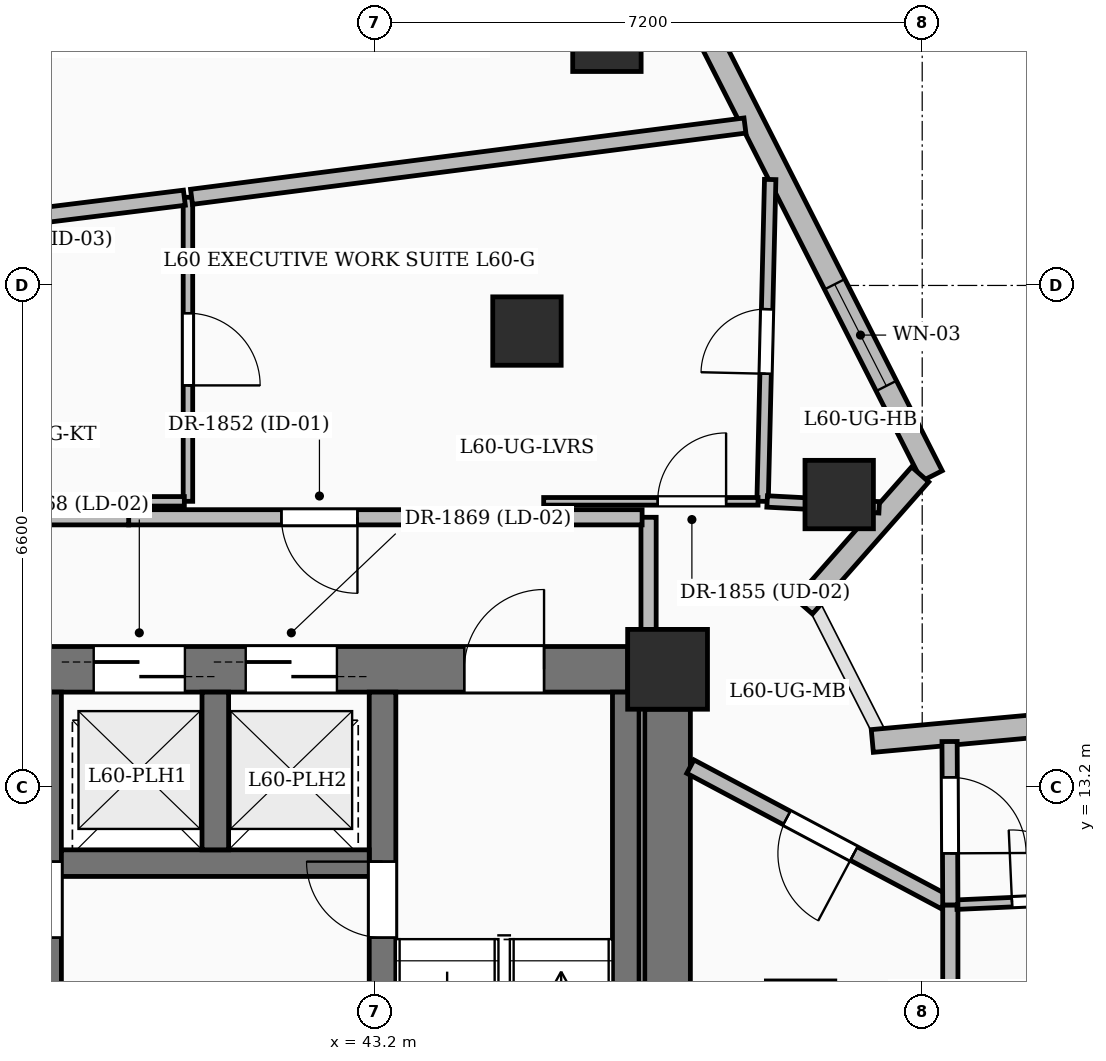
"""IFC4 building model, lengths in metres.
Left out: names, types, materials, properties, quantities, classifications, styles, units other than length and angle.
Written with IfcOpenShell. Run it as: python <this file> out.ifc"""

import sys

from ifc_helpers import new_model, si_unit, direction, frame, frame_2d, origin, origin_2d, place, context, subcontext, project, spatial, rectangle, extrude, element, fill, save


model = new_model("IFC4")
c1 = context("Model", 3, precision=1e-05, world=origin(), true_north=direction((0.0, 1.0)))
c2 = subcontext(c1, "Body", "Model", "MODEL_VIEW")
j1 = project(units=[si_unit("LENGTHUNIT", "METRE"), si_unit("PLANEANGLEUNIT", "RADIAN")], contexts=[c1])
p1 = place(None, origin())
s1 = spatial("IfcSite", under=j1, at=p1, CompositionType="ELEMENT")
p2 = place(p1, origin())
s2 = spatial("IfcBuilding", under=s1, at=p2, CompositionType="ELEMENT")
p3 = place(p2, frame((0.0, 0.0, 233.25)))
s3 = spatial("IfcBuildingStorey", under=s2, at=p3, CompositionType="ELEMENT", Elevation=233.25)
p4 = place(p3, frame((47.05, 14.75, 0.0), z_axis=(0.0, 0.0, 1.0), x_axis=(1.0, 0.0, 0.0)))
e1 = element("IfcColumn", 1, at=p4, inside=s3, PredefinedType="COLUMN", context=c2, shape_type="SweptSolid", body=[
    extrude(rectangle(XDim=1.05, YDim=1.05, at=origin_2d()), origin(), (0.0, 0.0, 1.0), 3.75),
])
p5 = place(p3, frame((45.2, 19.2, 0.0), z_axis=(0.0, 0.0, 1.0), x_axis=(1.0, 0.0, 0.0)))
e2 = element("IfcColumn", 2, at=p5, inside=s3, PredefinedType="COLUMN", context=c2, shape_type="SweptSolid", body=[
    extrude(rectangle(XDim=0.9, YDim=0.9, at=origin_2d()), origin(), (0.0, 0.0, 1.0), 3.75),
])
p6 = place(p3, frame((35.675, 14.75, 0.0), z_axis=(0.0, 0.0, 1.0), x_axis=(1.0, 0.0, 0.0)))
e3 = element("IfcWall", 3, at=p6, inside=s3, PredefinedType="SHEAR", context=c2, shape_type="SweptSolid", body=[
    extrude(rectangle(XDim=10.85, YDim=0.6, at=frame_2d((5.425, 0.0))), origin(), (0.0, 0.0, 1.0), 3.75),
])
p7 = place(p6, frame((1.1, 0.0, 0.0)))
e4 = element("IfcOpeningElement", 4, at=p7, cuts=e3, PredefinedType="OPENING", context=c2, shape_type="SweptSolid", body=[
    extrude(rectangle(XDim=1.05, YDim=2.15, at=frame_2d((0.525, 1.075))), frame((0.0, 0.31, 0.0), z_axis=(0.0, -1.0, 0.0), x_axis=(1.0, 0.0, 0.0)), (0.0, 0.0, 1.0), 0.62),
])
p8 = place(p6, frame((8.7, 0.0, 0.0)))
e5 = element("IfcOpeningElement", 5, at=p8, cuts=e3, PredefinedType="OPENING", context=c2, shape_type="SweptSolid", body=[
    extrude(rectangle(XDim=1.05, YDim=2.15, at=frame_2d((0.525, 1.075))), frame((0.0, 0.31, 0.0), z_axis=(0.0, -1.0, 0.0), x_axis=(1.0, 0.0, 0.0)), (0.0, 0.0, 1.0), 0.62),
])
p9 = place(p6, frame((3.825, 0.0, 0.0)))
e6 = element("IfcOpeningElement", 6, at=p9, cuts=e3, PredefinedType="OPENING", context=c2, shape_type="SweptSolid", body=[
    extrude(rectangle(XDim=1.2, YDim=2.2, at=frame_2d((0.6, 1.1))), frame((0.0, 0.31, 0.0), z_axis=(0.0, -1.0, 0.0), x_axis=(1.0, 0.0, 0.0)), (0.0, 0.0, 1.0), 0.62),
])
p10 = place(p6, frame((5.825, 0.0, 0.0)))
e7 = element("IfcOpeningElement", 7, at=p10, cuts=e3, PredefinedType="OPENING", context=c2, shape_type="SweptSolid", body=[
    extrude(rectangle(XDim=1.2, YDim=2.2, at=frame_2d((0.6, 1.1))), frame((0.0, 0.31, 0.0), z_axis=(0.0, -1.0, 0.0), x_axis=(1.0, 0.0, 0.0)), (0.0, 0.0, 1.0), 0.62),
])
p11 = place(p3, frame((47.05, 5.075, 0.0), z_axis=(0.0, 0.0, 1.0), x_axis=(0.0, 1.0, 0.0)))
e8 = element("IfcWall", 8, at=p11, inside=s3, PredefinedType="SHEAR", context=c2, shape_type="SweptSolid", body=[
    extrude(rectangle(XDim=9.15, YDim=0.6, at=frame_2d((4.575, 0.0))), origin(), (0.0, 0.0, 1.0), 3.75),
])
p12 = place(p3, frame((38.9, 5.2, 0.0), z_axis=(0.0, 0.0, 1.0), x_axis=(0.0, 1.0, 0.0)))
e9 = element("IfcWall", 9, at=p12, inside=s3, PredefinedType="SOLIDWALL", context=c2, shape_type="SweptSolid", body=[
    extrude(rectangle(XDim=9.25, YDim=0.35, at=frame_2d((4.625, 0.0))), origin(), (0.0, 0.0, 1.0), 3.75),
])
p13 = place(p12, frame((6.02, 0.0, 0.0)))
e10 = element("IfcOpeningElement", 10, at=p13, cuts=e9, PredefinedType="OPENING", context=c2, shape_type="SweptSolid", body=[
    extrude(rectangle(XDim=1.0, YDim=2.15, at=frame_2d((0.5, 1.075))), frame((0.0, 0.185, 0.0), z_axis=(0.0, -1.0, 0.0), x_axis=(1.0, 0.0, 0.0)), (0.0, 0.0, 1.0), 0.37),
])
p14 = place(p3, frame((43.3, 5.2, 0.0), z_axis=(0.0, 0.0, 1.0), x_axis=(0.0, 1.0, 0.0)))
e11 = element("IfcWall", 11, at=p14, inside=s3, PredefinedType="SOLIDWALL", context=c2, shape_type="SweptSolid", body=[
    extrude(rectangle(XDim=9.25, YDim=0.35, at=frame_2d((4.625, 0.0))), origin(), (0.0, 0.0, 1.0), 3.75),
])
p15 = place(p14, frame((6.02, 0.0, 0.0)))
e12 = element("IfcOpeningElement", 12, at=p15, cuts=e11, PredefinedType="OPENING", context=c2, shape_type="SweptSolid", body=[
    extrude(rectangle(XDim=1.0, YDim=2.15, at=frame_2d((0.5, 1.075))), frame((0.0, 0.185, 0.0), z_axis=(0.0, -1.0, 0.0), x_axis=(1.0, 0.0, 0.0)), (0.0, 0.0, 1.0), 0.37),
])
p16 = place(p3, frame((46.5, 5.2, 0.0), z_axis=(0.0, 0.0, 1.0), x_axis=(0.0, 1.0, 0.0)))
e13 = element("IfcWall", 13, at=p16, inside=s3, PredefinedType="SOLIDWALL", context=c2, shape_type="SweptSolid", body=[
    extrude(rectangle(XDim=9.25, YDim=0.35, at=frame_2d((4.625, 0.0))), origin(), (0.0, 0.0, 1.0), 3.75),
])
p17 = place(p3, frame((39.075, 12.2, 0.0), z_axis=(0.0, 0.0, 1.0), x_axis=(1.0, 0.0, 0.0)))
e14 = element("IfcWall", 14, at=p17, inside=s3, PredefinedType="SOLIDWALL", context=c2, shape_type="SweptSolid", body=[
    extrude(rectangle(XDim=4.05, YDim=0.35, at=frame_2d((2.025, 0.0))), origin(), (0.0, 0.0, 1.0), 3.75),
])
p18 = place(p3, frame((41.1, 12.375, 0.0), z_axis=(0.0, 0.0, 1.0), x_axis=(0.0, 1.0, 0.0)))
e15 = element("IfcWall", 15, at=p18, inside=s3, PredefinedType="SOLIDWALL", context=c2, shape_type="SweptSolid", body=[
    extrude(rectangle(XDim=2.075, YDim=0.35, at=frame_2d((1.038, 0.0))), origin(), (0.0, 0.0, 1.0), 3.75),
])
for number, where, z_axis, x_axis in (
    (16, (49.308, 17.049, 0.0), (0.0, 0.0, 1.0), (1.0, 0.0, 0.0)),
    (17, (46.252, 23.065, 0.0), (0.0, 0.0, 1.0), (1.0, 0.0, 0.0)),
):
    element("IfcColumn", number, at=place(p3, frame(where, z_axis=z_axis, x_axis=x_axis)), inside=s3, PredefinedType="COLUMN", context=c2, shape_type="SweptSolid", body=[
        extrude(rectangle(XDim=0.9, YDim=0.9, at=origin_2d()), origin(), (0.0, 0.0, 1.0), 3.75),
    ])
p19 = place(p3, frame((47.369, 23.516, 0.0), z_axis=(0.0, 0.0, 1.0), x_axis=(0.452872520075, -0.891575280367, 0.0)))
e18 = element("IfcWall", 18, at=p19, inside=s3, PredefinedType="SOLIDWALL", context=c2, shape_type="SweptSolid", body=[
    extrude(rectangle(XDim=6.978, YDim=0.3, at=frame_2d((3.489, 0.0))), origin(), (0.0, 0.0, 1.0), 3.5),
])
p20 = place(p19, frame((4.15, 0.0, 0.6)))
e19 = element("IfcOpeningElement", 19, at=p20, cuts=e18, PredefinedType="OPENING", context=c2, shape_type="SweptSolid", body=[
    extrude(rectangle(XDim=1.5, YDim=2.1, at=frame_2d((0.75, 1.05))), frame((0.0, 0.16, 0.0), z_axis=(0.0, -1.0, 0.0), x_axis=(1.0, 0.0, 0.0)), (0.0, 0.0, 1.0), 0.32),
])
p21 = place(p3, frame((50.374, 17.314, 0.0), z_axis=(0.0, 0.0, 1.0), x_axis=(-0.661181862719, -0.750225662325, 0.0)))
e20 = element("IfcWall", 20, at=p21, inside=s3, PredefinedType="SOLIDWALL", context=c2, shape_type="SweptSolid", body=[
    extrude(rectangle(XDim=2.314, YDim=0.3, at=frame_2d((1.157, 0.0))), origin(), (0.0, 0.0, 1.0), 2.825),
])
p22 = place(p3, frame((49.744, 13.807, 0.0), z_axis=(0.0, 0.0, 1.0), x_axis=(0.995831248554, 0.091214715932, 0.0)))
e21 = element("IfcWall", 21, at=p22, inside=s3, PredefinedType="SOLIDWALL", context=c2, shape_type="SweptSolid", body=[
    extrude(rectangle(XDim=2.594, YDim=0.3, at=frame_2d((1.297, 0.0))), origin(), (0.0, 0.0, 1.0), 2.825),
])
p23 = place(p3, frame((44.98, 16.75, 0.0), z_axis=(0.0, 0.0, 1.0), x_axis=(-1.0, 0.0, 0.0)))
e22 = element("IfcWall", 22, at=p23, inside=s3, PredefinedType="PARTITIONING", context=c2, shape_type="SweptSolid", body=[
    extrude(rectangle(XDim=5.02, YDim=0.2, at=frame_2d((2.51, 0.0))), origin(), (0.0, 0.0, 1.0), 3.5),
])
p24 = place(p23, frame((2.01, 0.0, 0.0)))
e23 = element("IfcOpeningElement", 23, at=p24, cuts=e22, PredefinedType="OPENING", context=c2, shape_type="SweptSolid", body=[
    extrude(rectangle(XDim=1.0, YDim=2.2, at=frame_2d((0.5, 1.1))), frame((0.0, 0.11, 0.0), z_axis=(0.0, -1.0, 0.0), x_axis=(1.0, 0.0, 0.0)), (0.0, 0.0, 1.0), 0.22),
])
p25 = place(p3, frame((39.96, 16.75, 0.0), z_axis=(0.0, 0.0, 1.0), x_axis=(-1.0, 0.0, 0.0)))
e24 = element("IfcWall", 24, at=p25, inside=s3, PredefinedType="PARTITIONING", context=c2, shape_type="SweptSolid", body=[
    extrude(rectangle(XDim=2.21, YDim=0.2, at=frame_2d((1.105, 0.0))), origin(), (0.0, 0.0, 1.0), 3.5),
])
p26 = place(p3, frame((46.8, 15.05, 0.0), z_axis=(0.0, 0.0, 1.0), x_axis=(0.0, 1.0, 0.0)))
e25 = element("IfcWall", 25, at=p26, inside=s3, PredefinedType="PARTITIONING", context=c2, shape_type="SweptSolid", body=[
    extrude(rectangle(XDim=1.7, YDim=0.2, at=frame_2d((0.85, 0.0))), origin(), (0.0, 0.0, 1.0), 2.685),
])
p27 = place(p3, frame((46.715, 16.75, 0.0), z_axis=(0.0, 0.0, 1.0), x_axis=(-1.0, 0.0, 0.0)))
e26 = element("IfcWall", 26, at=p27, inside=s3, PredefinedType="PARTITIONING", context=c2, shape_type="SweptSolid", body=[
    extrude(rectangle(XDim=1.675, YDim=0.2, at=frame_2d((0.837, 0.0))), origin(), (0.0, 0.0, 1.0), 2.685),
])
p28 = place(p3, frame((50.77, 8.16, 0.0), z_axis=(0.0, 0.0, 1.0), x_axis=(0.0, 1.0, 0.0)))
e27 = element("IfcWall", 27, at=p28, inside=s3, PredefinedType="PARTITIONING", context=c2, shape_type="SweptSolid", body=[
    extrude(rectangle(XDim=3.49, YDim=0.2, at=frame_2d((1.745, 0.0))), origin(), (0.0, 0.0, 1.0), 2.685),
])
p29 = place(p3, frame((50.695, 11.69, 0.0), z_axis=(0.0, 0.0, 1.0), x_axis=(-0.882785979597, 0.469775386996, 0.0)))
e28 = element("IfcWall", 28, at=p29, inside=s3, PredefinedType="PARTITIONING", context=c2, shape_type="SweptSolid", body=[
    extrude(rectangle(XDim=3.789, YDim=0.2, at=frame_2d((1.895, 0.0))), origin(), (0.0, 0.0, 1.0), 3.5),
])
p30 = place(p29, frame((1.352, 0.0, 0.0)))
e29 = element("IfcOpeningElement", 29, at=p30, cuts=e28, PredefinedType="OPENING", context=c2, shape_type="SweptSolid", body=[
    extrude(rectangle(XDim=1.0, YDim=2.2, at=frame_2d((0.5, 1.1))), frame((0.0, 0.11, 0.0), z_axis=(0.0, -1.0, 0.0), x_axis=(1.0, 0.0, 0.0)), (0.0, 0.0, 1.0), 0.22),
])
p31 = place(p3, frame((50.855, 11.654, 0.0), z_axis=(0.0, 0.0, 1.0), x_axis=(0.998974472406, 0.045276964139, 0.0)))
e30 = element("IfcWall", 30, at=p31, inside=s3, PredefinedType="PARTITIONING", context=c2, shape_type="SweptSolid", body=[
    extrude(rectangle(XDim=2.373, YDim=0.125, at=frame_2d((1.186, 0.0))), origin(), (0.0, 0.0, 1.0), 2.82),
])
p32 = place(p31, frame((0.727, 0.0, 0.0)))
e31 = element("IfcOpeningElement", 31, at=p32, cuts=e30, PredefinedType="OPENING", context=c2, shape_type="SweptSolid", body=[
    extrude(rectangle(XDim=0.95, YDim=2.2, at=frame_2d((0.475, 1.1))), frame((0.0, 0.072, 0.0), z_axis=(0.0, -1.0, 0.0), x_axis=(1.0, 0.0, 0.0)), (0.0, 0.0, 1.0), 0.145),
])
p33 = place(p3, frame((50.76, 13.8, 0.0), z_axis=(0.0, 0.0, 1.0), x_axis=(0.004655337313, -0.999989163859, 0.0)))
e32 = element("IfcWall", 32, at=p33, inside=s3, PredefinedType="PARTITIONING", context=c2, shape_type="SweptSolid", body=[
    extrude(rectangle(XDim=2.15, YDim=0.2, at=frame_2d((1.075, 0.0))), origin(), (0.0, 0.0, 1.0), 2.82),
])
p34 = place(p33, frame((0.471, 0.0, 0.0)))
e33 = element("IfcOpeningElement", 33, at=p34, cuts=e32, PredefinedType="OPENING", context=c2, shape_type="SweptSolid", body=[
    extrude(rectangle(XDim=1.0, YDim=2.2, at=frame_2d((0.5, 1.1))), frame((0.0, 0.11, 0.0), z_axis=(0.0, -1.0, 0.0), x_axis=(1.0, 0.0, 0.0)), (0.0, 0.0, 1.0), 0.22),
])
p35 = place(p3, frame((48.3, 16.96, 0.0), z_axis=(0.0, 0.0, 1.0), x_axis=(0.023576446584, 0.999722036951, 0.0)))
e34 = element("IfcWall", 34, at=p35, inside=s3, PredefinedType="PARTITIONING", context=c2, shape_type="SweptSolid", body=[
    extrude(rectangle(XDim=4.235, YDim=0.15, at=frame_2d((2.118, 0.0))), origin(), (0.0, 0.0, 1.0), 2.82),
])
p36 = place(p35, frame((1.679, 0.0, 0.0)))
e35 = element("IfcOpeningElement", 35, at=p36, cuts=e34, PredefinedType="OPENING", context=c2, shape_type="SweptSolid", body=[
    extrude(rectangle(XDim=0.85, YDim=2.1, at=frame_2d((0.425, 1.05))), frame((0.0, 0.085, 0.0), z_axis=(0.0, -1.0, 0.0), x_axis=(1.0, 0.0, 0.0)), (0.0, 0.0, 1.0), 0.17),
])
p37 = place(p3, frame((40.74, 20.96, 0.0), z_axis=(0.0, 0.0, 1.0), x_axis=(0.0, -1.0, 0.0)))
e36 = element("IfcWall", 36, at=p37, inside=s3, PredefinedType="PARTITIONING", context=c2, shape_type="SweptSolid", body=[
    extrude(rectangle(XDim=4.0, YDim=0.125, at=frame_2d((2.0, 0.0))), origin(), (0.0, 0.0, 1.0), 3.5),
])
p38 = place(p37, frame((1.525, 0.0, 0.0)))
e37 = element("IfcOpeningElement", 37, at=p38, cuts=e36, PredefinedType="OPENING", context=c2, shape_type="SweptSolid", body=[
    extrude(rectangle(XDim=0.95, YDim=2.2, at=frame_2d((0.475, 1.1))), frame((0.0, 0.072, 0.0), z_axis=(0.0, -1.0, 0.0), x_axis=(1.0, 0.0, 0.0)), (0.0, 0.0, 1.0), 0.145),
])
p39 = place(p3, frame((40.692, 16.96, 0.0), z_axis=(0.0, 0.0, 1.0), x_axis=(-1.0, 0.0, 0.0)))
e38 = element("IfcWall", 38, at=p39, inside=s3, PredefinedType="PARTITIONING", context=c2, shape_type="SweptSolid", body=[
    extrude(rectangle(XDim=0.732, YDim=0.125, at=frame_2d((0.366, 0.0))), origin(), (0.0, 0.0, 1.0), 3.5),
])
p40 = place(p3, frame((45.42, 16.96, 0.0), z_axis=(0.0, 0.0, 1.0), x_axis=(1.0, 0.0, 0.0)))
e39 = element("IfcWall", 39, at=p40, inside=s3, PredefinedType="PARTITIONING", context=c2, shape_type="SweptSolid", body=[
    extrude(rectangle(XDim=2.82, YDim=0.1, at=frame_2d((1.41, 0.0))), origin(), (0.0, 0.0, 1.0), 2.685),
])
p41 = place(p40, frame((1.5, 0.0, 0.0)))
e40 = element("IfcOpeningElement", 40, at=p41, cuts=e39, PredefinedType="OPENING", context=c2, shape_type="SweptSolid", body=[
    extrude(rectangle(XDim=0.9, YDim=2.15, at=frame_2d((0.45, 1.075))), frame((0.0, 0.06, 0.0), z_axis=(0.0, -1.0, 0.0), x_axis=(1.0, 0.0, 0.0)), (0.0, 0.0, 1.0), 0.12),
])
p42 = place(p3, frame((48.068, 21.904, 0.0), z_axis=(0.0, 0.0, 1.0), x_axis=(-0.991803716191, -0.127770843899, 0.0)))
e41 = element("IfcWall", 41, at=p42, inside=s3, PredefinedType="PARTITIONING", context=c2, shape_type="SweptSolid", body=[
    extrude(rectangle(XDim=7.341, YDim=0.2, at=frame_2d((3.67, 0.0))), origin(), (0.0, 0.0, 1.0), 2.685),
])
p43 = place(p3, frame((48.36, 16.958, 0.0), z_axis=(0.0, 0.0, 1.0), x_axis=(0.998641489287, -0.052107349532, 0.0)))
e42 = element("IfcWall", 42, at=p43, inside=s3, PredefinedType="PARTITIONING", context=c2, shape_type="SweptSolid", body=[
    extrude(rectangle(XDim=1.476, YDim=0.15, at=frame_2d((0.738, 0.0))), origin(), (0.0, 0.0, 1.0), 3.5),
])
p44 = place(p3, frame((40.693, 20.954, 0.0), z_axis=(0.0, 0.0, 1.0), x_axis=(-0.992428411634, -0.122824459212, 0.0)))
e43 = element("IfcWall", 43, at=p44, inside=s3, PredefinedType="PARTITIONING", context=c2, shape_type="SweptSolid", body=[
    extrude(rectangle(XDim=2.88, YDim=0.2, at=frame_2d((1.44, 0.0))), origin(), (0.0, 0.0, 1.0), 3.5),
])
p45 = place(p3, frame((44.11, 29.699, 0.0), z_axis=(0.0, 0.0, 1.0), x_axis=(-0.661580960231, -0.749873744746, 0.0)))
e44 = element("IfcWall", 44, at=p45, inside=s3, PredefinedType="PARTITIONING", context=c2, shape_type="SweptSolid", body=[
    extrude(rectangle(XDim=9.529, YDim=0.2, at=frame_2d((4.764, 0.0))), origin(), (0.0, 0.0, 1.0), 2.685),
])
p46 = place(p20, origin())
e45 = element("IfcWindow", 45, at=p46, inside=s3, PartitioningType="SINGLE_PANEL", PredefinedType="WINDOW", context=c2, shape_type="SweptSolid", body=[
    extrude(rectangle(XDim=1.5, YDim=2.1, at=frame_2d((0.75, 1.05))), frame((0.0, 0.03, 0.0), z_axis=(0.0, -1.0, 0.0), x_axis=(1.0, 0.0, 0.0)), (0.0, 0.0, 1.0), 0.06),
])
fill(e19, e45)
p47 = place(p8, origin())
e46 = element("IfcDoor", 46, at=p47, inside=s3, OperationType="SINGLE_SWING_RIGHT", PredefinedType="DOOR", context=c2, shape_type="SweptSolid", body=[
    extrude(rectangle(XDim=1.05, YDim=2.15, at=frame_2d((0.525, 1.075))), frame((0.0, 0.025, 0.0), z_axis=(0.0, -1.0, 0.0), x_axis=(1.0, 0.0, 0.0)), (0.0, 0.0, 1.0), 0.05),
])
fill(e5, e46)
p48 = place(p15, origin())
e47 = element("IfcDoor", 47, at=p48, inside=s3, OperationType="SINGLE_SWING_RIGHT", PredefinedType="DOOR", context=c2, shape_type="SweptSolid", body=[
    extrude(rectangle(XDim=1.0, YDim=2.15, at=frame_2d((0.5, 1.075))), frame((0.0, 0.025, 0.0), z_axis=(0.0, -1.0, 0.0), x_axis=(1.0, 0.0, 0.0)), (0.0, 0.0, 1.0), 0.05),
])
fill(e12, e47)
p49 = place(p9, origin())
e48 = element("IfcDoor", 48, at=p49, inside=s3, OperationType="DOUBLE_DOOR_SLIDING", PredefinedType="DOOR", context=c2, shape_type="SweptSolid", body=[
    extrude(rectangle(XDim=1.2, YDim=2.2, at=frame_2d((0.6, 1.1))), frame((0.0, 0.025, 0.0), z_axis=(0.0, -1.0, 0.0), x_axis=(1.0, 0.0, 0.0)), (0.0, 0.0, 1.0), 0.05),
])
fill(e6, e48)
p50 = place(p10, origin())
e49 = element("IfcDoor", 49, at=p50, inside=s3, OperationType="DOUBLE_DOOR_SLIDING", PredefinedType="DOOR", context=c2, shape_type="SweptSolid", body=[
    extrude(rectangle(XDim=1.2, YDim=2.2, at=frame_2d((0.6, 1.1))), frame((0.0, 0.025, 0.0), z_axis=(0.0, -1.0, 0.0), x_axis=(1.0, 0.0, 0.0)), (0.0, 0.0, 1.0), 0.05),
])
fill(e7, e49)
p51 = place(p32, origin())
e50 = element("IfcDoor", 50, at=p51, inside=s3, OperationType="SINGLE_SWING_LEFT", PredefinedType="DOOR", context=c2, shape_type="SweptSolid", body=[
    extrude(rectangle(XDim=0.95, YDim=2.2, at=frame_2d((0.475, 1.1))), frame((0.0, 0.025, 0.0), z_axis=(0.0, -1.0, 0.0), x_axis=(1.0, 0.0, 0.0)), (0.0, 0.0, 1.0), 0.05),
])
fill(e31, e50)
p52 = place(p24, origin())
e51 = element("IfcDoor", 51, at=p52, inside=s3, OperationType="SINGLE_SWING_LEFT", PredefinedType="DOOR", context=c2, shape_type="SweptSolid", body=[
    extrude(rectangle(XDim=1.0, YDim=2.2, at=frame_2d((0.5, 1.1))), frame((0.0, 0.025, 0.0), z_axis=(0.0, -1.0, 0.0), x_axis=(1.0, 0.0, 0.0)), (0.0, 0.0, 1.0), 0.05),
])
fill(e23, e51)
p53 = place(p38, origin())
e52 = element("IfcDoor", 52, at=p53, inside=s3, OperationType="SINGLE_SWING_RIGHT", PredefinedType="DOOR", context=c2, shape_type="SweptSolid", body=[
    extrude(rectangle(XDim=0.95, YDim=2.2, at=frame_2d((0.475, 1.1))), frame((0.0, 0.025, 0.0), z_axis=(0.0, -1.0, 0.0), x_axis=(1.0, 0.0, 0.0)), (0.0, 0.0, 1.0), 0.05),
])
fill(e37, e52)
p54 = place(p36, origin())
e53 = element("IfcDoor", 53, at=p54, inside=s3, OperationType="SINGLE_SWING_LEFT", PredefinedType="DOOR", context=c2, shape_type="SweptSolid", body=[
    extrude(rectangle(XDim=0.85, YDim=2.1, at=frame_2d((0.425, 1.05))), frame((0.0, 0.025, 0.0), z_axis=(0.0, -1.0, 0.0), x_axis=(1.0, 0.0, 0.0)), (0.0, 0.0, 1.0), 0.05),
])
fill(e35, e53)
p55 = place(p41, origin())
e54 = element("IfcDoor", 54, at=p55, inside=s3, OperationType="SINGLE_SWING_RIGHT", PredefinedType="DOOR", context=c2, shape_type="SweptSolid", body=[
    extrude(rectangle(XDim=0.9, YDim=2.15, at=frame_2d((0.45, 1.075))), frame((0.0, 0.025, 0.0), z_axis=(0.0, -1.0, 0.0), x_axis=(1.0, 0.0, 0.0)), (0.0, 0.0, 1.0), 0.05),
])
fill(e40, e54)
p56 = place(p30, origin())
e55 = element("IfcDoor", 55, at=p56, inside=s3, OperationType="SINGLE_SWING_LEFT", PredefinedType="DOOR", context=c2, shape_type="SweptSolid", body=[
    extrude(rectangle(XDim=1.0, YDim=2.2, at=frame_2d((0.5, 1.1))), frame((0.0, 0.025, 0.0), z_axis=(0.0, -1.0, 0.0), x_axis=(1.0, 0.0, 0.0)), (0.0, 0.0, 1.0), 0.05),
])
fill(e29, e55)
p57 = place(p34, origin())
e56 = element("IfcDoor", 56, at=p57, inside=s3, OperationType="SINGLE_SWING_RIGHT", PredefinedType="DOOR", context=c2, shape_type="SweptSolid", body=[
    extrude(rectangle(XDim=1.0, YDim=2.2, at=frame_2d((0.5, 1.1))), frame((0.0, 0.025, 0.0), z_axis=(0.0, -1.0, 0.0), x_axis=(1.0, 0.0, 0.0)), (0.0, 0.0, 1.0), 0.05),
])
fill(e33, e56)
save(model, sys.argv[1])
